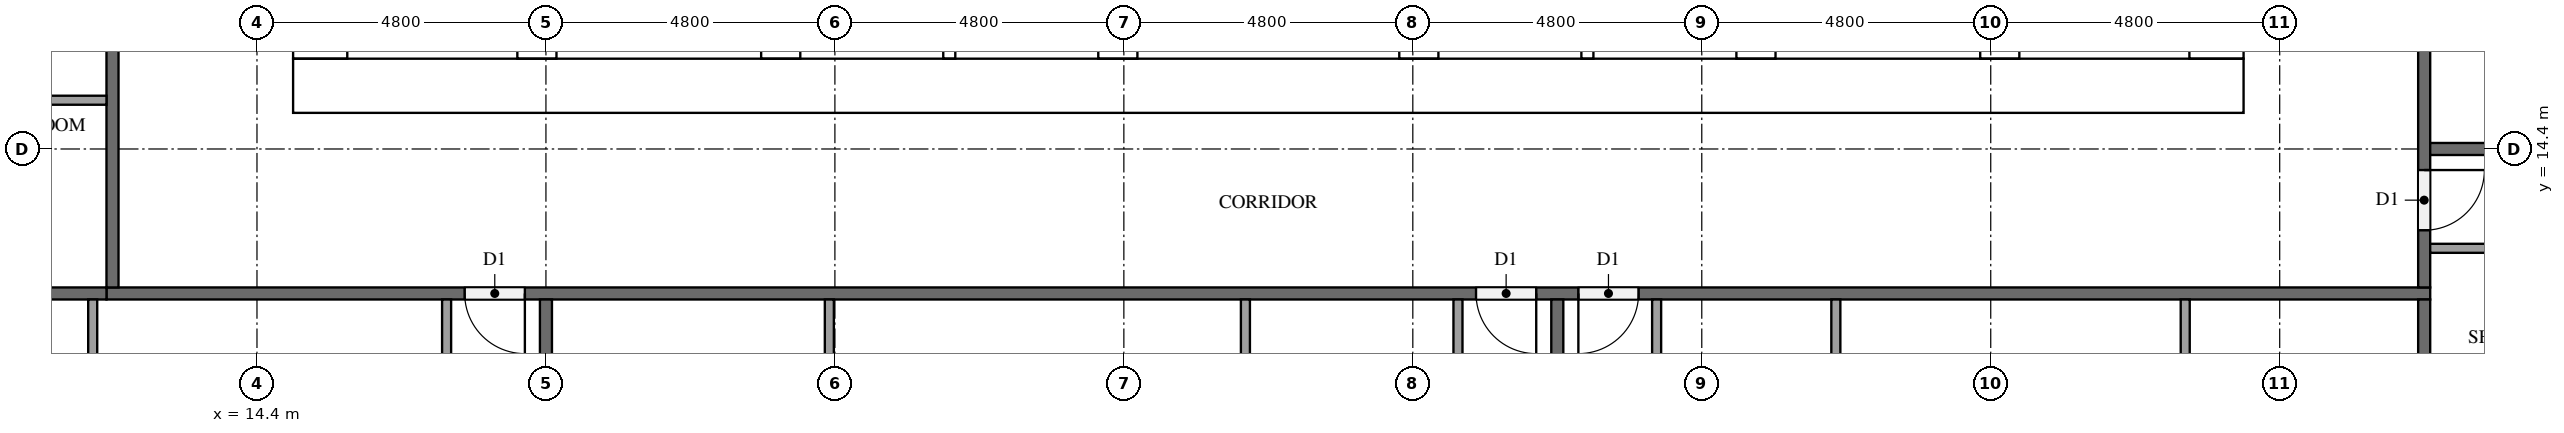
"""IFC4 building model, lengths in metres.
Left out: names, types, materials, properties, quantities, classifications, styles, units other than length and angle.
Written with IfcOpenShell. Run it as: python <this file> out.ifc"""

import sys

from ifc_helpers import new_model, si_unit, direction, frame, frame_2d, origin, place, context, subcontext, project, spatial, rectangle, extrude, element, fill, save


model = new_model("IFC4")
c1 = context("Model", 3, precision=1e-05, world=origin(), true_north=direction((0.0, 1.0)))
c2 = subcontext(c1, "Body", "Model", "MODEL_VIEW")
j1 = project(units=[si_unit("LENGTHUNIT", "METRE"), si_unit("PLANEANGLEUNIT", "RADIAN")], contexts=[c1])
p1 = place(None, origin())
s1 = spatial("IfcSite", under=j1, at=p1, CompositionType="ELEMENT")
p2 = place(p1, origin())
s2 = spatial("IfcBuilding", under=s1, at=p2, CompositionType="ELEMENT")
p3 = place(p2, frame((0.0, 0.0, 80.3)))
s3 = spatial("IfcBuildingStorey", under=s2, at=p3, CompositionType="ELEMENT", Elevation=80.3)
p4 = place(p3, frame((15.0, 15.45, 0.0), z_axis=(0.0, 0.0, 1.0), x_axis=(1.0, 0.0, 0.0)))
e1 = element("IfcWall", 1, at=p4, inside=s3, PredefinedType="SHEAR", context=c2, shape_type="SweptSolid", body=[
    extrude(rectangle(XDim=32.4, YDim=0.9, at=frame_2d((16.2, 0.0))), origin(), (0.0, 0.0, 1.0), 3.1),
])
p5 = place(p4, frame((15.3, 0.0, 0.0)))
e2 = element("IfcOpeningElement", 2, at=p5, cuts=e1, PredefinedType="OPENING", context=c2, shape_type="SweptSolid", body=[
    extrude(rectangle(XDim=1.8, YDim=2.1, at=frame_2d((0.9, 1.05))), frame((0.0, 0.46, 0.0), z_axis=(0.0, -1.0, 0.0), x_axis=(1.0, 0.0, 0.0)), (0.0, 0.0, 1.0), 0.92),
])
p6 = place(p3, frame((15.45, 15.9, 0.0), z_axis=(0.0, 0.0, 1.0), x_axis=(0.0, 1.0, 0.0)))
e3 = element("IfcWall", 3, at=p6, inside=s3, PredefinedType="SHEAR", context=c2, shape_type="SweptSolid", body=[
    extrude(rectangle(XDim=21.0, YDim=0.9, at=frame_2d((10.5, 0.0))), origin(), (0.0, 0.0, 1.0), 3.1),
])
p7 = place(p6, frame((4.86, 0.0, 0.0)))
e4 = element("IfcOpeningElement", 4, at=p7, cuts=e3, PredefinedType="OPENING", context=c2, shape_type="SweptSolid", body=[
    extrude(rectangle(XDim=1.2, YDim=2.1, at=frame_2d((0.6, 1.05))), frame((0.0, 0.46, 0.0), z_axis=(0.0, -1.0, 0.0), x_axis=(1.0, 0.0, 0.0)), (0.0, 0.0, 1.0), 0.92),
])
p8 = place(p3, frame((46.95, 15.9, 0.0), z_axis=(0.0, 0.0, 1.0), x_axis=(0.0, 1.0, 0.0)))
e5 = element("IfcWall", 5, at=p8, inside=s3, PredefinedType="SHEAR", context=c2, shape_type="SweptSolid", body=[
    extrude(rectangle(XDim=21.0, YDim=0.9, at=frame_2d((10.5, 0.0))), origin(), (0.0, 0.0, 1.0), 3.1),
])
p9 = place(p8, frame((10.2, 0.0, 0.0)))
e6 = element("IfcOpeningElement", 6, at=p9, cuts=e5, PredefinedType="OPENING", context=c2, shape_type="SweptSolid", body=[
    extrude(rectangle(XDim=1.2, YDim=2.1, at=frame_2d((0.6, 1.05))), frame((0.0, 0.46, 0.0), z_axis=(0.0, -1.0, 0.0), x_axis=(1.0, 0.0, 0.0)), (0.0, 0.0, 1.0), 0.92),
])
p10 = place(p3, frame((19.05, 15.9, 0.0), z_axis=(0.0, 0.0, 1.0), x_axis=(0.0, 1.0, 0.0)))
e7 = element("IfcWall", 7, at=p10, inside=s3, PredefinedType="SHEAR", context=c2, shape_type="SweptSolid", body=[
    extrude(rectangle(XDim=15.025, YDim=0.65, at=frame_2d((7.513, 0.0))), origin(), (0.0, 0.0, 1.0), 3.1),
])
p11 = place(p10, frame((9.55, 0.0, 0.0)))
e8 = element("IfcOpeningElement", 8, at=p11, cuts=e7, PredefinedType="OPENING", context=c2, shape_type="SweptSolid", body=[
    extrude(rectangle(XDim=1.1, YDim=2.1, at=frame_2d((0.55, 1.05))), frame((0.0, 0.335, 0.0), z_axis=(0.0, -1.0, 0.0), x_axis=(1.0, 0.0, 0.0)), (0.0, 0.0, 1.0), 0.67),
])
p12 = place(p10, frame((13.05, 0.0, 0.0)))
e9 = element("IfcOpeningElement", 9, at=p12, cuts=e7, PredefinedType="OPENING", context=c2, shape_type="SweptSolid", body=[
    extrude(rectangle(XDim=1.1, YDim=2.1, at=frame_2d((0.55, 1.05))), frame((0.0, 0.335, 0.0), z_axis=(0.0, -1.0, 0.0), x_axis=(1.0, 0.0, 0.0)), (0.0, 0.0, 1.0), 0.67),
])
p13 = place(p10, frame((0.3, 0.0, 0.0)))
e10 = element("IfcOpeningElement", 10, at=p13, cuts=e7, PredefinedType="OPENING", context=c2, shape_type="SweptSolid", body=[
    extrude(rectangle(XDim=1.2, YDim=2.1, at=frame_2d((0.6, 1.05))), frame((0.0, 0.335, 0.0), z_axis=(0.0, -1.0, 0.0), x_axis=(1.0, 0.0, 0.0)), (0.0, 0.0, 1.0), 0.67),
])
p14 = place(p3, frame((23.1, 15.9, 0.0), z_axis=(0.0, 0.0, 1.0), x_axis=(0.0, 1.0, 0.0)))
e11 = element("IfcWall", 11, at=p14, inside=s3, PredefinedType="SHEAR", context=c2, shape_type="SweptSolid", body=[
    extrude(rectangle(XDim=21.0, YDim=0.65, at=frame_2d((10.5, 0.0))), origin(), (0.0, 0.0, 1.0), 3.1),
])
p15 = place(p3, frame((39.3, 15.9, 0.0), z_axis=(0.0, 0.0, 1.0), x_axis=(0.0, 1.0, 0.0)))
e12 = element("IfcWall", 12, at=p15, inside=s3, PredefinedType="SHEAR", context=c2, shape_type="SweptSolid", body=[
    extrude(rectangle(XDim=8.35, YDim=0.65, at=frame_2d((4.175, 0.0))), origin(), (0.0, 0.0, 1.0), 3.1),
])
p16 = place(p3, frame((43.35, 15.9, 0.0), z_axis=(0.0, 0.0, 1.0), x_axis=(0.0, 1.0, 0.0)))
e13 = element("IfcWall", 13, at=p16, inside=s3, PredefinedType="SHEAR", context=c2, shape_type="SweptSolid", body=[
    extrude(rectangle(XDim=8.35, YDim=0.65, at=frame_2d((4.175, 0.0))), origin(), (0.0, 0.0, 1.0), 3.1),
])
p17 = place(p16, frame((0.3, 0.0, 0.0)))
e14 = element("IfcOpeningElement", 14, at=p17, cuts=e13, PredefinedType="OPENING", context=c2, shape_type="SweptSolid", body=[
    extrude(rectangle(XDim=1.2, YDim=2.1, at=frame_2d((0.6, 1.05))), frame((0.0, 0.335, 0.0), z_axis=(0.0, -1.0, 0.0), x_axis=(1.0, 0.0, 0.0)), (0.0, 0.0, 1.0), 0.67),
])
for number, where, z_axis, x_axis in (
    (15, (28.7, 15.9, 0.0), (0.0, 0.0, 1.0), (0.0, 1.0, 0.0)),
    (16, (33.7, 15.9, 0.0), (0.0, 0.0, 1.0), (0.0, 1.0, 0.0)),
):
    element("IfcWall", number, at=place(p3, frame(where, z_axis=z_axis, x_axis=x_axis)), inside=s3, PredefinedType="SHEAR", context=c2, shape_type="SweptSolid", body=[
        extrude(rectangle(XDim=2.525, YDim=0.65, at=frame_2d((1.263, 0.0))), origin(), (0.0, 0.0, 1.0), 3.1),
    ])
for number, where, z_axis, x_axis in (
    (17, (25.9, 15.9, 0.0), (0.0, 0.0, 1.0), (0.0, 1.0, 0.0)),
    (18, (36.5, 15.9, 0.0), (0.0, 0.0, 1.0), (0.0, 1.0, 0.0)),
):
    element("IfcWall", number, at=place(p3, frame(where, z_axis=z_axis, x_axis=x_axis)), inside=s3, PredefinedType="SOLIDWALL", context=c2, shape_type="SweptSolid", body=[
        extrude(rectangle(XDim=2.525, YDim=0.2, at=frame_2d((1.263, 0.0))), origin(), (0.0, 0.0, 1.0), 3.1),
    ])
p18 = place(p3, frame((50.5, 12.0, 0.0), z_axis=(0.0, 0.0, 1.0), x_axis=(-1.0, 0.0, 0.0)))
e19 = element("IfcWall", 19, at=p18, inside=s3, PredefinedType="PARTITIONING", context=c2, shape_type="SweptSolid", body=[
    extrude(rectangle(XDim=38.6, YDim=0.2, at=frame_2d((19.3, 0.0))), origin(), (0.0, 0.0, 1.0), 3.1),
])
p19 = place(p18, frame((31.65, 0.0, 0.0)))
e20 = element("IfcOpeningElement", 20, at=p19, cuts=e19, PredefinedType="OPENING", context=c2, shape_type="SweptSolid", body=[
    extrude(rectangle(XDim=1.0, YDim=2.1, at=frame_2d((0.5, 1.05))), frame((0.0, 0.11, 0.0), z_axis=(0.0, -1.0, 0.0), x_axis=(1.0, 0.0, 0.0)), (0.0, 0.0, 1.0), 0.22),
])
p20 = place(p18, frame((14.85, 0.0, 0.0)))
e21 = element("IfcOpeningElement", 21, at=p20, cuts=e19, PredefinedType="OPENING", context=c2, shape_type="SweptSolid", body=[
    extrude(rectangle(XDim=1.0, YDim=2.1, at=frame_2d((0.5, 1.05))), frame((0.0, 0.11, 0.0), z_axis=(0.0, -1.0, 0.0), x_axis=(1.0, 0.0, 0.0)), (0.0, 0.0, 1.0), 0.22),
])
p21 = place(p18, frame((13.15, 0.0, 0.0)))
e22 = element("IfcOpeningElement", 22, at=p21, cuts=e19, PredefinedType="OPENING", context=c2, shape_type="SweptSolid", body=[
    extrude(rectangle(XDim=1.0, YDim=2.1, at=frame_2d((0.5, 1.05))), frame((0.0, 0.11, 0.0), z_axis=(0.0, -1.0, 0.0), x_axis=(1.0, 0.0, 0.0)), (0.0, 0.0, 1.0), 0.22),
])
p22 = place(p3, frame((50.4, 40.7, 0.0), z_axis=(0.0, 0.0, 1.0), x_axis=(0.0, -1.0, 0.0)))
e23 = element("IfcWall", 23, at=p22, inside=s3, PredefinedType="PARTITIONING", context=c2, shape_type="SweptSolid", body=[
    extrude(rectangle(XDim=28.6, YDim=0.2, at=frame_2d((14.3, 0.0))), origin(), (0.0, 0.0, 1.0), 3.1),
])
p23 = place(p22, frame((26.65, 0.0, 0.0)))
e24 = element("IfcOpeningElement", 24, at=p23, cuts=e23, PredefinedType="OPENING", context=c2, shape_type="SweptSolid", body=[
    extrude(rectangle(XDim=1.0, YDim=2.1, at=frame_2d((0.5, 1.05))), frame((0.0, 0.11, 0.0), z_axis=(0.0, -1.0, 0.0), x_axis=(1.0, 0.0, 0.0)), (0.0, 0.0, 1.0), 0.22),
])
p24 = place(p22, frame((9.85, 0.0, 0.0)))
e25 = element("IfcOpeningElement", 25, at=p24, cuts=e23, PredefinedType="OPENING", context=c2, shape_type="SweptSolid", body=[
    extrude(rectangle(XDim=1.0, YDim=2.1, at=frame_2d((0.5, 1.05))), frame((0.0, 0.11, 0.0), z_axis=(0.0, -1.0, 0.0), x_axis=(1.0, 0.0, 0.0)), (0.0, 0.0, 1.0), 0.22),
])
p25 = place(p22, frame((2.65, 0.0, 0.0)))
e26 = element("IfcOpeningElement", 26, at=p25, cuts=e23, PredefinedType="OPENING", context=c2, shape_type="SweptSolid", body=[
    extrude(rectangle(XDim=1.0, YDim=2.1, at=frame_2d((0.5, 1.05))), frame((0.0, 0.11, 0.0), z_axis=(0.0, -1.0, 0.0), x_axis=(1.0, 0.0, 0.0)), (0.0, 0.0, 1.0), 0.22),
])
p26 = place(p22, frame((0.95, 0.0, 0.0)))
e27 = element("IfcOpeningElement", 27, at=p26, cuts=e23, PredefinedType="OPENING", context=c2, shape_type="SweptSolid", body=[
    extrude(rectangle(XDim=1.0, YDim=2.1, at=frame_2d((0.5, 1.05))), frame((0.0, 0.11, 0.0), z_axis=(0.0, -1.0, 0.0), x_axis=(1.0, 0.0, 0.0)), (0.0, 0.0, 1.0), 0.22),
])
p27 = place(p3, frame((12.0, 12.1, 0.0), z_axis=(0.0, 0.0, 1.0), x_axis=(0.0, 1.0, 0.0)))
e28 = element("IfcWall", 28, at=p27, inside=s3, PredefinedType="PARTITIONING", context=c2, shape_type="SweptSolid", body=[
    extrude(rectangle(XDim=28.6, YDim=0.2, at=frame_2d((14.3, 0.0))), origin(), (0.0, 0.0, 1.0), 3.1),
])
p28 = place(p27, frame((17.05, 0.0, 0.0)))
e29 = element("IfcOpeningElement", 29, at=p28, cuts=e28, PredefinedType="OPENING", context=c2, shape_type="SweptSolid", body=[
    extrude(rectangle(XDim=1.0, YDim=2.1, at=frame_2d((0.5, 1.05))), frame((0.0, 0.11, 0.0), z_axis=(0.0, -1.0, 0.0), x_axis=(1.0, 0.0, 0.0)), (0.0, 0.0, 1.0), 0.22),
])
p29 = place(p27, frame((15.35, 0.0, 0.0)))
e30 = element("IfcOpeningElement", 30, at=p29, cuts=e28, PredefinedType="OPENING", context=c2, shape_type="SweptSolid", body=[
    extrude(rectangle(XDim=1.0, YDim=2.1, at=frame_2d((0.5, 1.05))), frame((0.0, 0.11, 0.0), z_axis=(0.0, -1.0, 0.0), x_axis=(1.0, 0.0, 0.0)), (0.0, 0.0, 1.0), 0.22),
])
p30 = place(p27, frame((8.15, 0.0, 0.0)))
e31 = element("IfcOpeningElement", 31, at=p30, cuts=e28, PredefinedType="OPENING", context=c2, shape_type="SweptSolid", body=[
    extrude(rectangle(XDim=1.0, YDim=2.1, at=frame_2d((0.5, 1.05))), frame((0.0, 0.11, 0.0), z_axis=(0.0, -1.0, 0.0), x_axis=(1.0, 0.0, 0.0)), (0.0, 0.0, 1.0), 0.22),
])
p31 = place(p3, frame((19.2, 11.9, 0.0), z_axis=(0.0, 0.0, 1.0), x_axis=(0.0, -1.0, 0.0)))
e32 = element("IfcWall", 32, at=p31, inside=s3, PredefinedType="PARTITIONING", context=c2, shape_type="SweptSolid", body=[
    extrude(rectangle(XDim=11.475, YDim=0.2, at=frame_2d((5.737, 0.0))), origin(), (0.0, 0.0, 1.0), 3.1),
])
p32 = place(p3, frame((4.9, 12.0, 0.0), z_axis=(0.0, 0.0, 1.0), x_axis=(1.0, 0.0, 0.0)))
e33 = element("IfcWall", 33, at=p32, inside=s3, PredefinedType="PARTITIONING", context=c2, shape_type="SweptSolid", body=[
    extrude(rectangle(XDim=7.0, YDim=0.2, at=frame_2d((3.5, 0.0))), origin(), (0.0, 0.0, 1.0), 3.1),
])
for number, where, z_axis, x_axis in (
    (34, (36.0, 11.9, 0.0), (0.0, 0.0, 1.0), (0.0, -1.0, 0.0)),
    (35, (50.4, 11.9, 0.0), (0.0, 0.0, 1.0), (0.0, -1.0, 0.0)),
):
    element("IfcWall", number, at=place(p3, frame(where, z_axis=z_axis, x_axis=x_axis)), inside=s3, PredefinedType="PARTITIONING", context=c2, shape_type="SweptSolid", body=[
        extrude(rectangle(XDim=11.8, YDim=0.2, at=frame_2d((5.9, 0.0))), origin(), (0.0, 0.0, 1.0), 3.1),
    ])
p33 = place(p3, frame((50.5, 14.4, 0.0), z_axis=(0.0, 0.0, 1.0), x_axis=(1.0, 0.0, 0.0)))
e36 = element("IfcWall", 36, at=p33, inside=s3, PredefinedType="PARTITIONING", context=c2, shape_type="SweptSolid", body=[
    extrude(rectangle(XDim=11.475, YDim=0.2, at=frame_2d((5.738, 0.0))), origin(), (0.0, 0.0, 1.0), 3.1),
])
p34 = place(p3, frame((11.671, 11.9, 0.0), z_axis=(0.0, 0.0, 1.0), x_axis=(0.0, -1.0, 0.0)))
e37 = element("IfcWall", 37, at=p34, inside=s3, PredefinedType="PARTITIONING", context=c2, shape_type="SweptSolid", body=[
    extrude(rectangle(XDim=2.975, YDim=0.15, at=frame_2d((1.487, 0.0))), origin(), (0.0, 0.0, 1.0), 3.1),
])
p35 = place(p3, frame((17.55, 11.9, 0.0), z_axis=(0.0, 0.0, 1.0), x_axis=(0.0, -1.0, 0.0)))
e38 = element("IfcWall", 38, at=p35, inside=s3, PredefinedType="PARTITIONING", context=c2, shape_type="SweptSolid", body=[
    extrude(rectangle(XDim=3.125, YDim=0.15, at=frame_2d((1.562, 0.0))), origin(), (0.0, 0.0, 1.0), 3.1),
])
for number, where, z_axis, x_axis in (
    (39, (30.819, 11.9, 0.0), (0.0, 0.0, 1.0), (0.0, -1.0, 0.0)),
    (40, (23.908, 11.9, 0.0), (0.0, 0.0, 1.0), (0.0, -1.0, 0.0)),
):
    element("IfcWall", number, at=place(p3, frame(where, z_axis=z_axis, x_axis=x_axis)), inside=s3, PredefinedType="PARTITIONING", context=c2, shape_type="SweptSolid", body=[
        extrude(rectangle(XDim=3.725, YDim=0.15, at=frame_2d((1.862, 0.0))), origin(), (0.0, 0.0, 1.0), 3.1),
    ])
p36 = place(p3, frame((34.35, 11.9, 0.0), z_axis=(0.0, 0.0, 1.0), x_axis=(0.0, -1.0, 0.0)))
e41 = element("IfcWall", 41, at=p36, inside=s3, PredefinedType="PARTITIONING", context=c2, shape_type="SweptSolid", body=[
    extrude(rectangle(XDim=3.875, YDim=0.15, at=frame_2d((1.938, 0.0))), origin(), (0.0, 0.0, 1.0), 3.1),
])
for number, where, z_axis, x_axis in (
    (42, (40.627, 11.9, 0.0), (0.0, 0.0, 1.0), (0.0, -1.0, 0.0)),
    (43, (46.431, 11.9, 0.0), (0.0, 0.0, 1.0), (0.0, -1.0, 0.0)),
):
    element("IfcWall", number, at=place(p3, frame(where, z_axis=z_axis, x_axis=x_axis)), inside=s3, PredefinedType="PARTITIONING", context=c2, shape_type="SweptSolid", body=[
        extrude(rectangle(XDim=4.325, YDim=0.15, at=frame_2d((2.163, 0.0))), origin(), (0.0, 0.0, 1.0), 3.1),
    ])
p37 = place(p3, frame((37.65, 11.9, 0.0), z_axis=(0.0, 0.0, 1.0), x_axis=(0.0, -1.0, 0.0)))
e44 = element("IfcWall", 44, at=p37, inside=s3, PredefinedType="PARTITIONING", context=c2, shape_type="SweptSolid", body=[
    extrude(rectangle(XDim=4.475, YDim=0.15, at=frame_2d((2.237, 0.0))), origin(), (0.0, 0.0, 1.0), 3.1),
])
p38 = place(p3, frame((50.5, 12.75, 0.0), z_axis=(0.0, 0.0, 1.0), x_axis=(1.0, 0.0, 0.0)))
e45 = element("IfcWall", 45, at=p38, inside=s3, PredefinedType="PARTITIONING", context=c2, shape_type="SweptSolid", body=[
    extrude(rectangle(XDim=4.475, YDim=0.15, at=frame_2d((2.238, 0.0))), origin(), (0.0, 0.0, 1.0), 3.1),
])
p39 = place(p3, frame((11.9, 15.21, 0.0), z_axis=(0.0, 0.0, 1.0), x_axis=(-1.0, 0.0, 0.0)))
e46 = element("IfcWall", 46, at=p39, inside=s3, PredefinedType="PARTITIONING", context=c2, shape_type="SweptSolid", body=[
    extrude(rectangle(XDim=2.375, YDim=0.15, at=frame_2d((1.188, 0.0))), origin(), (0.0, 0.0, 1.0), 3.1),
])
p40 = place(p5, frame((1.8, 0.0, 0.0), z_axis=(0.0, 0.0, 1.0), x_axis=(-1.0, 0.0, 0.0)))
e47 = element("IfcDoor", 47, at=p40, inside=s3, OperationType="DOUBLE_DOOR_SINGLE_SWING", PredefinedType="DOOR", context=c2, shape_type="SweptSolid", body=[
    extrude(rectangle(XDim=1.8, YDim=2.1, at=frame_2d((0.9, 1.05))), frame((0.0, 0.025, 0.0), z_axis=(0.0, -1.0, 0.0), x_axis=(1.0, 0.0, 0.0)), (0.0, 0.0, 1.0), 0.05),
])
fill(e2, e47)
p41 = place(p19, origin())
e48 = element("IfcDoor", 48, at=p41, inside=s3, OperationType="SINGLE_SWING_LEFT", PredefinedType="DOOR", context=c2, shape_type="SweptSolid", body=[
    extrude(rectangle(XDim=1.0, YDim=2.1, at=frame_2d((0.5, 1.05))), frame((0.0, 0.025, 0.0), z_axis=(0.0, -1.0, 0.0), x_axis=(1.0, 0.0, 0.0)), (0.0, 0.0, 1.0), 0.05),
])
fill(e20, e48)
p42 = place(p20, origin())
e49 = element("IfcDoor", 49, at=p42, inside=s3, OperationType="SINGLE_SWING_LEFT", PredefinedType="DOOR", context=c2, shape_type="SweptSolid", body=[
    extrude(rectangle(XDim=1.0, YDim=2.1, at=frame_2d((0.5, 1.05))), frame((0.0, 0.025, 0.0), z_axis=(0.0, -1.0, 0.0), x_axis=(1.0, 0.0, 0.0)), (0.0, 0.0, 1.0), 0.05),
])
fill(e21, e49)
p43 = place(p21, origin())
e50 = element("IfcDoor", 50, at=p43, inside=s3, OperationType="SINGLE_SWING_RIGHT", PredefinedType="DOOR", context=c2, shape_type="SweptSolid", body=[
    extrude(rectangle(XDim=1.0, YDim=2.1, at=frame_2d((0.5, 1.05))), frame((0.0, 0.025, 0.0), z_axis=(0.0, -1.0, 0.0), x_axis=(1.0, 0.0, 0.0)), (0.0, 0.0, 1.0), 0.05),
])
fill(e22, e50)
p44 = place(p23, origin())
e51 = element("IfcDoor", 51, at=p44, inside=s3, OperationType="SINGLE_SWING_LEFT", PredefinedType="DOOR", context=c2, shape_type="SweptSolid", body=[
    extrude(rectangle(XDim=1.0, YDim=2.1, at=frame_2d((0.5, 1.05))), frame((0.0, 0.025, 0.0), z_axis=(0.0, -1.0, 0.0), x_axis=(1.0, 0.0, 0.0)), (0.0, 0.0, 1.0), 0.05),
])
fill(e24, e51)
save(model, sys.argv[1])
